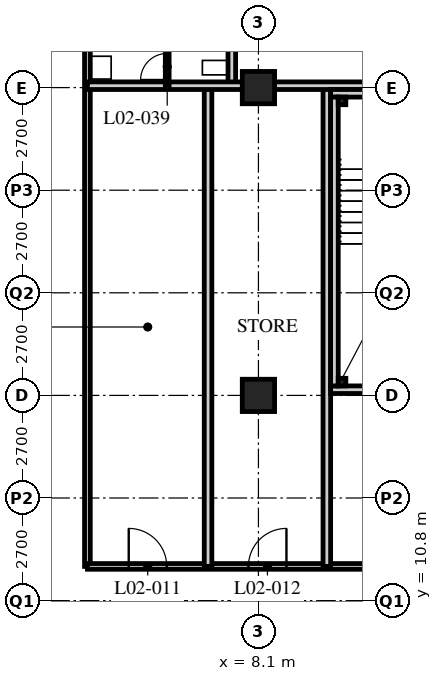
"""IFC4 building model, lengths in metres.
Left out: names, types, materials, properties, quantities, classifications, styles, units other than length and angle.
Written with IfcOpenShell. Run it as: python <this file> out.ifc"""

import sys

from ifc_helpers import new_model, si_unit, direction, frame, frame_2d, origin, origin_2d, place, context, subcontext, project, spatial, rectangle, hollow_rectangle, extrude, element, fill, save


model = new_model("IFC4")
c1 = context("Model", 3, precision=1e-05, world=origin(), true_north=direction((0.0, 1.0)))
c2 = subcontext(c1, "Body", "Model", "MODEL_VIEW")
j1 = project(units=[si_unit("LENGTHUNIT", "METRE"), si_unit("PLANEANGLEUNIT", "RADIAN")], contexts=[c1])
p1 = place(None, origin())
s1 = spatial("IfcSite", under=j1, at=p1, CompositionType="ELEMENT")
p2 = place(p1, origin())
s2 = spatial("IfcBuilding", under=s1, at=p2, CompositionType="ELEMENT")
p3 = place(p2, frame((0.0, 0.0, 11.4)))
s3 = spatial("IfcBuildingStorey", under=s2, at=p3, CompositionType="ELEMENT", Elevation=11.4)
for number, where, z_axis, x_axis in (
    (1, (8.1, 16.2, 0.0), (0.0, 0.0, 1.0), (1.0, 0.0, 0.0)),
    (2, (8.1, 24.3, 0.0), (0.0, 0.0, 1.0), (1.0, 0.0, 0.0)),
):
    element("IfcColumn", number, at=place(p3, frame(where, z_axis=z_axis, x_axis=x_axis)), inside=s3, PredefinedType="COLUMN", context=c2, shape_type="SweptSolid", body=[
        extrude(hollow_rectangle(XDim=0.85, YDim=0.85, WallThickness=0.085, at=origin_2d()), origin(), (0.0, 0.0, 1.0), 5.4),
    ])
p4 = place(p3, frame((3.6, 40.5, 0.0), z_axis=(0.0, 0.0, 1.0), x_axis=(0.0, -1.0, 0.0)))
e3 = element("IfcWall", 3, at=p4, inside=s3, PredefinedType="PARTITIONING", context=c2, shape_type="SweptSolid", body=[
    extrude(rectangle(XDim=28.8, YDim=0.15, at=frame_2d((14.4, 0.0))), origin(), (0.0, 0.0, 1.0), 5.15),
])
p5 = place(p4, frame((13.375, 0.0, 0.0)))
e4 = element("IfcOpeningElement", 4, at=p5, cuts=e3, PredefinedType="OPENING", context=c2, shape_type="SweptSolid", body=[
    extrude(rectangle(XDim=0.85, YDim=2.1, at=frame_2d((0.425, 1.05))), frame((0.0, 0.085, 0.0), z_axis=(0.0, -1.0, 0.0), x_axis=(1.0, 0.0, 0.0)), (0.0, 0.0, 1.0), 0.17),
])
p6 = place(p4, frame((9.25, 0.0, 0.0)))
e5 = element("IfcOpeningElement", 5, at=p6, cuts=e3, PredefinedType="OPENING", context=c2, shape_type="SweptSolid", body=[
    extrude(rectangle(XDim=1.0, YDim=2.1, at=frame_2d((0.5, 1.05))), frame((0.0, 0.085, 0.0), z_axis=(0.0, -1.0, 0.0), x_axis=(1.0, 0.0, 0.0)), (0.0, 0.0, 1.0), 0.17),
])
p7 = place(p4, frame((4.875, 0.0, 0.0)))
e6 = element("IfcOpeningElement", 6, at=p7, cuts=e3, PredefinedType="OPENING", context=c2, shape_type="SweptSolid", body=[
    extrude(rectangle(XDim=0.85, YDim=2.1, at=frame_2d((0.425, 1.05))), frame((0.0, 0.085, 0.0), z_axis=(0.0, -1.0, 0.0), x_axis=(1.0, 0.0, 0.0)), (0.0, 0.0, 1.0), 0.17),
])
p8 = place(p4, frame((0.75, 0.0, 0.0)))
e7 = element("IfcOpeningElement", 7, at=p8, cuts=e3, PredefinedType="OPENING", context=c2, shape_type="SweptSolid", body=[
    extrude(rectangle(XDim=1.0, YDim=2.1, at=frame_2d((0.5, 1.05))), frame((0.0, 0.085, 0.0), z_axis=(0.0, -1.0, 0.0), x_axis=(1.0, 0.0, 0.0)), (0.0, 0.0, 1.0), 0.17),
])
p9 = place(p3, frame((3.6, 11.7, 0.0), z_axis=(0.0, 0.0, 1.0), x_axis=(1.0, 0.0, 0.0)))
e8 = element("IfcWall", 8, at=p9, inside=s3, PredefinedType="PARTITIONING", context=c2, shape_type="SweptSolid", body=[
    extrude(rectangle(XDim=23.54, YDim=0.15, at=frame_2d((11.77, 0.0))), origin(), (0.0, 0.0, 1.0), 5.15),
])
p10 = place(p9, frame((1.087, 0.0, 0.0)))
e9 = element("IfcOpeningElement", 9, at=p10, cuts=e8, PredefinedType="OPENING", context=c2, shape_type="SweptSolid", body=[
    extrude(rectangle(XDim=1.0, YDim=2.1, at=frame_2d((0.5, 1.05))), frame((0.0, 0.085, 0.0), z_axis=(0.0, -1.0, 0.0), x_axis=(1.0, 0.0, 0.0)), (0.0, 0.0, 1.0), 0.17),
])
p11 = place(p9, frame((4.237, 0.0, 0.0)))
e10 = element("IfcOpeningElement", 10, at=p11, cuts=e8, PredefinedType="OPENING", context=c2, shape_type="SweptSolid", body=[
    extrude(rectangle(XDim=1.0, YDim=2.1, at=frame_2d((0.5, 1.05))), frame((0.0, 0.085, 0.0), z_axis=(0.0, -1.0, 0.0), x_axis=(1.0, 0.0, 0.0)), (0.0, 0.0, 1.0), 0.17),
])
p12 = place(p9, frame((16.725, 0.0, 0.0)))
e11 = element("IfcOpeningElement", 11, at=p12, cuts=e8, PredefinedType="OPENING", context=c2, shape_type="SweptSolid", body=[
    extrude(rectangle(XDim=1.0, YDim=2.1, at=frame_2d((0.5, 1.05))), frame((0.0, 0.085, 0.0), z_axis=(0.0, -1.0, 0.0), x_axis=(1.0, 0.0, 0.0)), (0.0, 0.0, 1.0), 0.17),
])
p13 = place(p3, frame((7.4, 24.3, 0.0), z_axis=(0.0, 0.0, 1.0), x_axis=(0.0, 1.0, 0.0)))
e12 = element("IfcWall", 12, at=p13, inside=s3, PredefinedType="SOLIDWALL", context=c2, shape_type="SweptSolid", body=[
    extrude(rectangle(XDim=4.8, YDim=0.2, at=frame_2d((2.4, 0.0))), origin(), (0.0, 0.0, 1.0), 5.15),
])
for number, where, z_axis, x_axis in (
    (13, (6.775, 11.7, 0.0), (0.0, 0.0, 1.0), (0.0, 1.0, 0.0)),
    (14, (9.9, 11.7, 0.0), (0.0, 0.0, 1.0), (0.0, 1.0, 0.0)),
):
    element("IfcWall", number, at=place(p3, frame(where, z_axis=z_axis, x_axis=x_axis)), inside=s3, PredefinedType="SOLIDWALL", context=c2, shape_type="SweptSolid", body=[
        extrude(rectangle(XDim=12.6, YDim=0.2, at=frame_2d((6.3, 0.0))), origin(), (0.0, 0.0, 1.0), 5.15),
    ])
p14 = place(p3, frame((3.6, 24.35, 0.0), z_axis=(0.0, 0.0, 1.0), x_axis=(1.0, 0.0, 0.0)))
e15 = element("IfcWall", 15, at=p14, inside=s3, PredefinedType="SOLIDWALL", context=c2, shape_type="SweptSolid", body=[
    extrude(rectangle(XDim=12.6, YDim=0.2, at=frame_2d((6.3, 0.0))), origin(), (0.0, 0.0, 1.0), 4.538),
])
p15 = place(p3, frame((5.7, 24.3, 0.0), z_axis=(0.0, 0.0, 1.0), x_axis=(0.0, 1.0, 0.0)))
e16 = element("IfcWall", 16, at=p15, inside=s3, PredefinedType="PARTITIONING", context=c2, shape_type="SweptSolid", body=[
    extrude(rectangle(XDim=2.1, YDim=0.1, at=frame_2d((1.05, 0.0))), origin(), (0.0, 0.0, 1.0), 5.15),
])
p16 = place(p15, frame((0.2, 0.0, 0.0)))
e17 = element("IfcOpeningElement", 17, at=p16, cuts=e16, PredefinedType="OPENING", context=c2, shape_type="SweptSolid", body=[
    extrude(rectangle(XDim=0.7, YDim=2.0, at=frame_2d((0.35, 1.0))), frame((0.0, 0.06, 0.0), z_axis=(0.0, -1.0, 0.0), x_axis=(1.0, 0.0, 0.0)), (0.0, 0.0, 1.0), 0.12),
])
p17 = place(p15, frame((1.225, 0.0, 0.0)))
e18 = element("IfcOpeningElement", 18, at=p17, cuts=e16, PredefinedType="OPENING", context=c2, shape_type="SweptSolid", body=[
    extrude(rectangle(XDim=0.7, YDim=2.0, at=frame_2d((0.35, 1.0))), frame((0.0, 0.06, 0.0), z_axis=(0.0, -1.0, 0.0), x_axis=(1.0, 0.0, 0.0)), (0.0, 0.0, 1.0), 0.12),
])
p18 = place(p3, frame((10.0, 16.35, 0.0), z_axis=(0.0, 0.0, 1.0), x_axis=(1.0, 0.0, 0.0)))
e19 = element("IfcWall", 19, at=p18, inside=s3, PredefinedType="SOLIDWALL", context=c2, shape_type="SweptSolid", body=[
    extrude(rectangle(XDim=4.4, YDim=0.2, at=frame_2d((2.2, 0.0))), origin(), (0.0, 0.0, 1.0), 4.538),
])
p19 = place(p18, frame((1.6, 0.0, 0.0)))
e20 = element("IfcOpeningElement", 20, at=p19, cuts=e19, PredefinedType="OPENING", context=c2, shape_type="SweptSolid", body=[
    extrude(rectangle(XDim=1.2, YDim=2.1, at=frame_2d((0.6, 1.05))), frame((0.0, 0.11, 0.0), z_axis=(0.0, -1.0, 0.0), x_axis=(1.0, 0.0, 0.0)), (0.0, 0.0, 1.0), 0.22),
])
p20 = place(p3, frame((10.0, 24.15, 0.0), z_axis=(0.0, 0.0, 1.0), x_axis=(1.0, 0.0, 0.0)))
e21 = element("IfcWall", 21, at=p20, inside=s3, PredefinedType="SOLIDWALL", context=c2, shape_type="SweptSolid", body=[
    extrude(rectangle(XDim=4.4, YDim=0.2, at=frame_2d((2.2, 0.0))), origin(), (0.0, 0.0, 1.0), 4.538),
])
p21 = place(p3, frame((10.1, 16.45, 0.0), z_axis=(0.0, 0.0, 1.0), x_axis=(0.0, 1.0, 0.0)))
e22 = element("IfcWall", 22, at=p21, inside=s3, PredefinedType="SOLIDWALL", context=c2, shape_type="SweptSolid", body=[
    extrude(rectangle(XDim=7.6, YDim=0.2, at=frame_2d((3.8, 0.0))), origin(), (0.0, 0.0, 1.0), 5.15),
])
for number, where, z_axis, x_axis in (
    (23, (10.3, 23.95, 0.0), (0.0, 0.0, 1.0), (1.0, 0.0, 0.0)),
    (24, (10.3, 16.55, 0.0), (0.0, 0.0, 1.0), (1.0, 0.0, 0.0)),
):
    element("IfcColumn", number, at=place(p3, frame(where, z_axis=z_axis, x_axis=x_axis)), inside=s3, PredefinedType="COLUMN", context=c2, shape_type="SweptSolid", body=[
        extrude(hollow_rectangle(XDim=0.2, YDim=0.2, WallThickness=0.012, at=origin_2d()), origin(), (0.0, 0.0, 1.0), 5.4),
    ])
p22 = place(p10, origin())
e25 = element("IfcDoor", 25, at=p22, inside=s3, OperationType="SINGLE_SWING_LEFT", PredefinedType="DOOR", context=c2, shape_type="SweptSolid", body=[
    extrude(rectangle(XDim=1.0, YDim=2.1, at=frame_2d((0.5, 1.05))), frame((0.0, 0.025, 0.0), z_axis=(0.0, -1.0, 0.0), x_axis=(1.0, 0.0, 0.0)), (0.0, 0.0, 1.0), 0.05),
])
fill(e9, e25)
p23 = place(p11, origin())
e26 = element("IfcDoor", 26, at=p23, inside=s3, OperationType="SINGLE_SWING_RIGHT", PredefinedType="DOOR", context=c2, shape_type="SweptSolid", body=[
    extrude(rectangle(XDim=1.0, YDim=2.1, at=frame_2d((0.5, 1.05))), frame((0.0, 0.025, 0.0), z_axis=(0.0, -1.0, 0.0), x_axis=(1.0, 0.0, 0.0)), (0.0, 0.0, 1.0), 0.05),
])
fill(e10, e26)
p24 = place(p16, origin())
e27 = element("IfcDoor", 27, at=p24, inside=s3, OperationType="SINGLE_SWING_LEFT", PredefinedType="DOOR", context=c2, shape_type="SweptSolid", body=[
    extrude(rectangle(XDim=0.7, YDim=2.0, at=frame_2d((0.35, 1.0))), frame((0.0, 0.025, 0.0), z_axis=(0.0, -1.0, 0.0), x_axis=(1.0, 0.0, 0.0)), (0.0, 0.0, 1.0), 0.05),
])
fill(e17, e27)
save(model, sys.argv[1])
